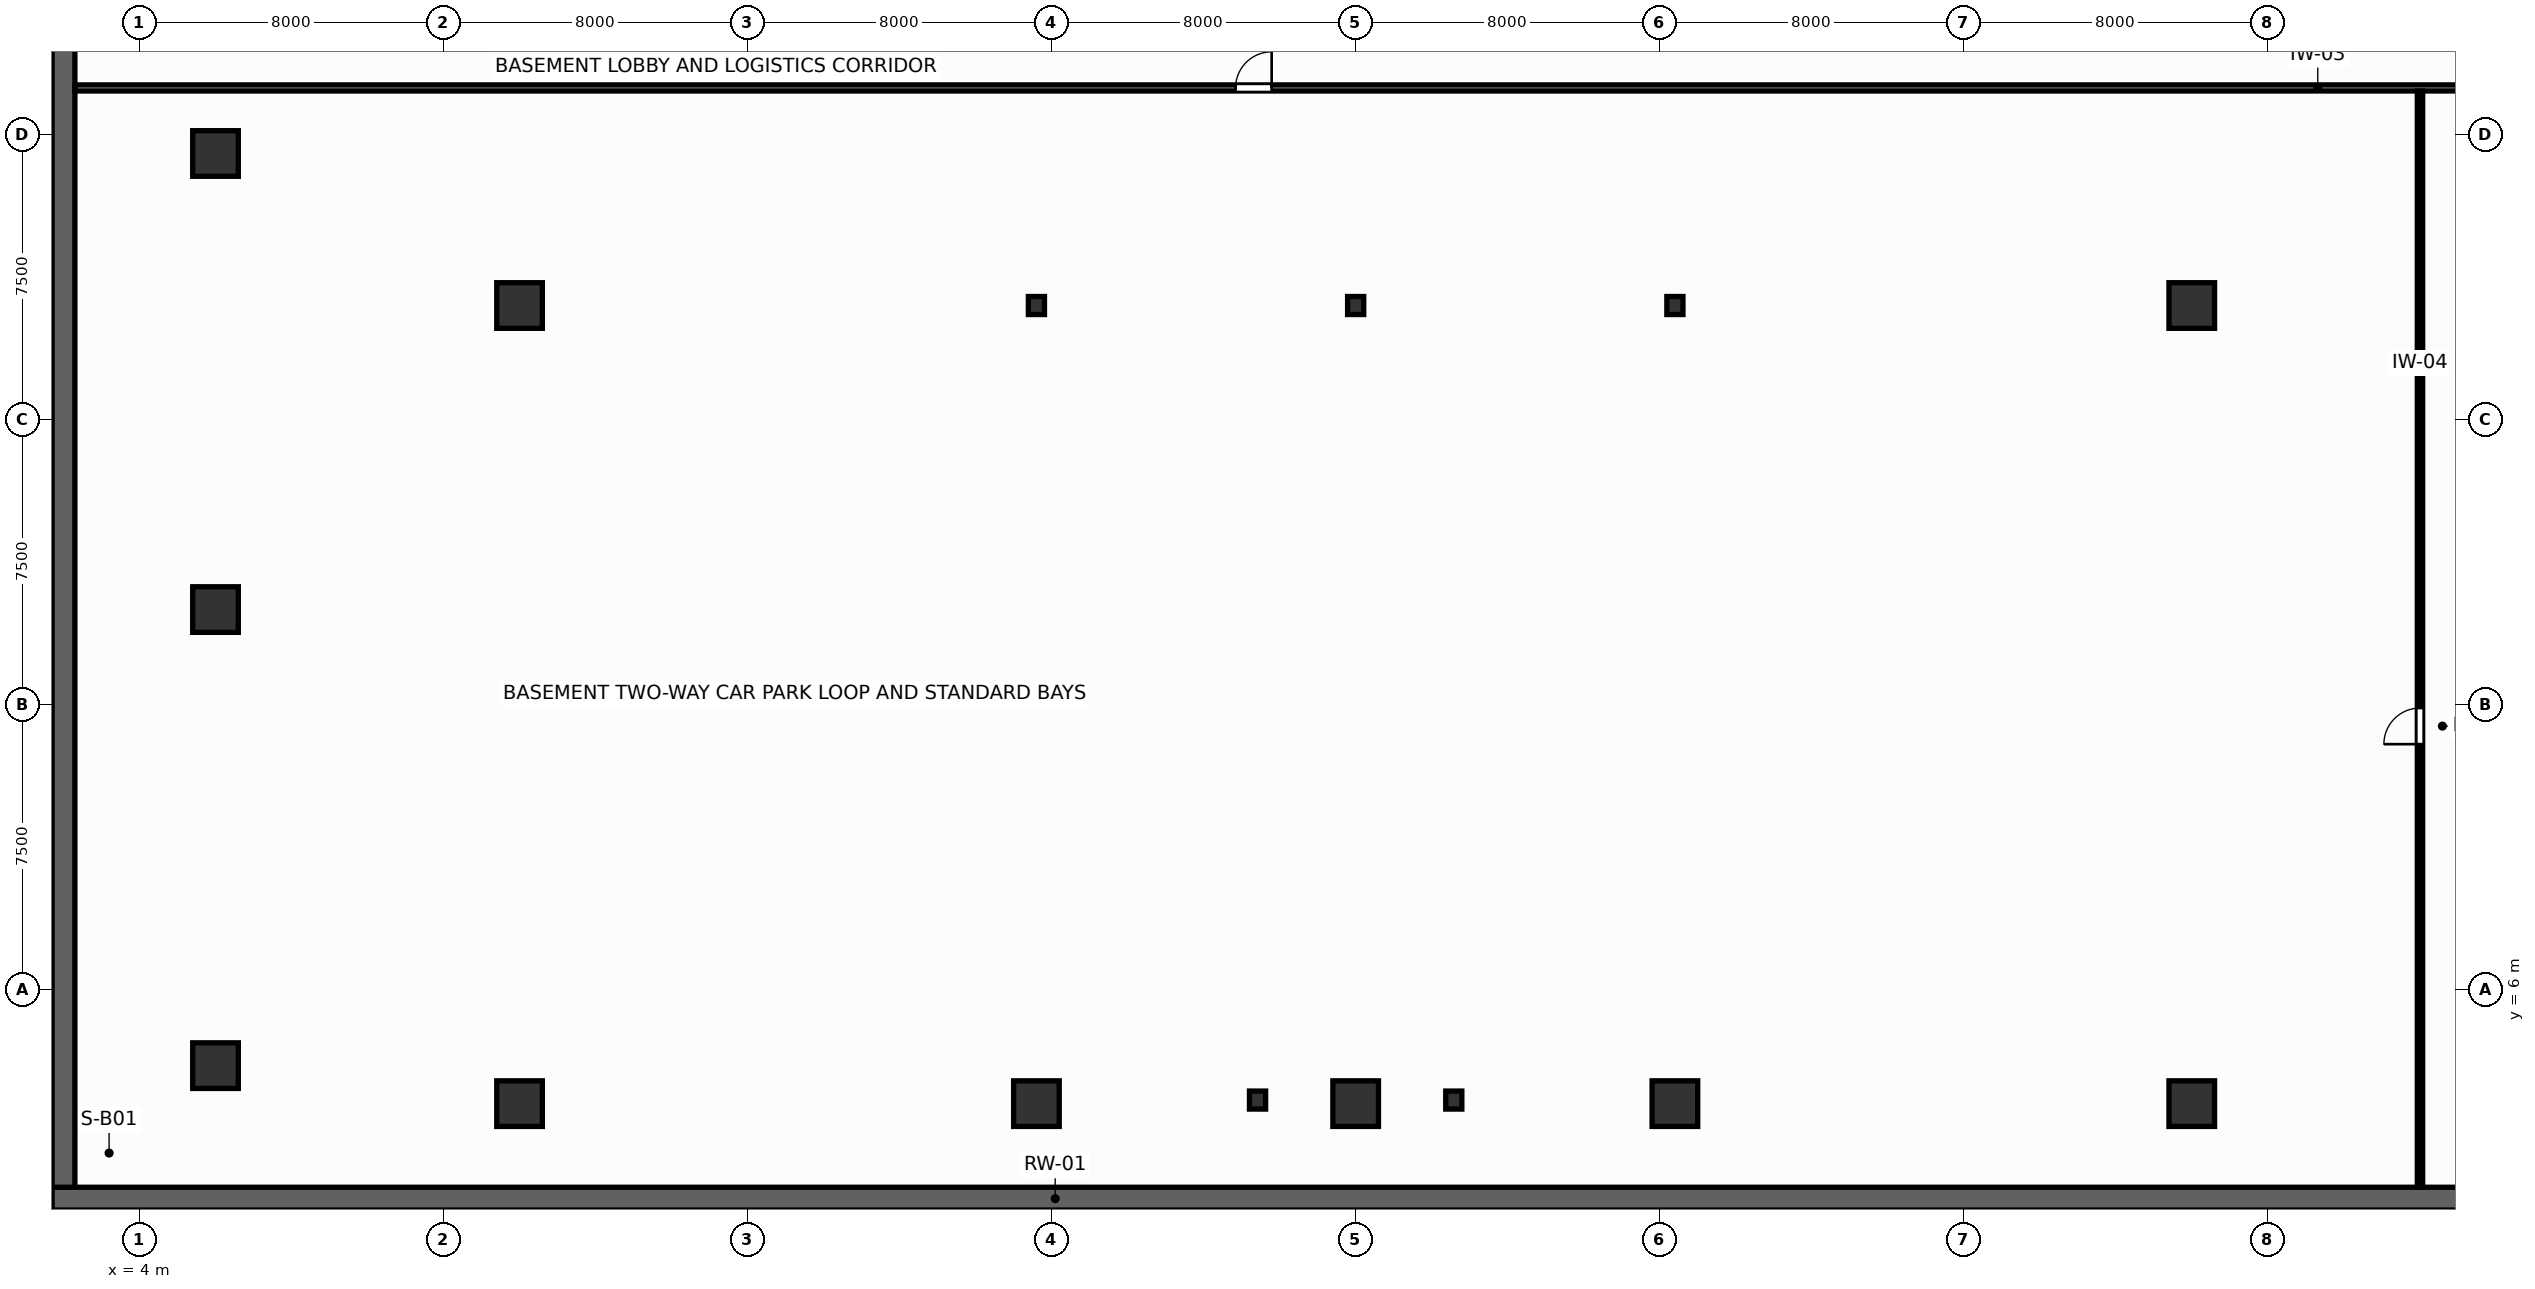
"""IFC4 building model, lengths in metres.
Left out: names, types, materials, properties, quantities, classifications, styles, units other than length and angle.
Written with IfcOpenShell. Run it as: python <this file> out.ifc"""

import sys

from ifc_helpers import new_model, si_unit, direction, frame, frame_2d, origin, origin_2d, place, context, subcontext, project, spatial, rectangle, i_section, extrude, source, transform, mapped, element, fill, save


model = new_model("IFC4")
c1 = context("Model", 3, precision=1e-05, world=origin(), true_north=direction((0.0, 1.0)))
c2 = subcontext(c1, "Body", "Model", "MODEL_VIEW")
j1 = project(units=[si_unit("LENGTHUNIT", "METRE"), si_unit("PLANEANGLEUNIT", "RADIAN")], contexts=[c1])
p1 = place(None, origin())
s1 = spatial("IfcSite", under=j1, at=p1, CompositionType="ELEMENT")
p2 = place(p1, origin())
s2 = spatial("IfcBuilding", under=s1, at=p2, CompositionType="ELEMENT")
p3 = place(p2, frame((0.0, 0.0, -4.5)))
s3 = spatial("IfcBuildingStorey", under=s2, at=p3, CompositionType="ELEMENT", Elevation=-4.5)
p4 = place(p3, frame((1.7, 0.5, 0.0), z_axis=(0.0, 0.0, 1.0), x_axis=(1.0, 0.0, 0.0)))
e1 = element("IfcWall", 1, at=p4, inside=s3, PredefinedType="SOLIDWALL", context=c2, shape_type="SweptSolid", body=[
    extrude(rectangle(XDim=87.98, YDim=0.6, at=frame_2d((43.99, 0.0))), origin(), (0.0, 0.0, 1.0), 4.5),
])
p5 = place(p3, frame((2.0, 0.8, 0.0), z_axis=(0.0, 0.0, 1.0), x_axis=(0.0, 1.0, 0.0)))
e2 = element("IfcWall", 2, at=p5, inside=s3, PredefinedType="SOLIDWALL", context=c2, shape_type="SweptSolid", body=[
    extrude(rectangle(XDim=64.9, YDim=0.6, at=frame_2d((32.45, 0.0))), origin(), (0.0, 0.0, 1.0), 4.5),
])
m1 = source(origin(), c2, "Body", "SweptSolid", [
    extrude(i_section(OverallWidth=0.424, OverallDepth=0.474, WebThickness=0.045, FlangeThickness=0.072, FilletRadius=0.015, at=origin_2d()), origin(), (0.0, 0.0, 1.0), 4.5),
])
for number, where, z_axis, x_axis in (
    (3, (27.6, 24.0, 0.0), (0.0, 0.0, 1.0), (1.0, 0.0, 0.0)),
    (4, (44.4, 24.0, 0.0), (0.0, 0.0, 1.0), (1.0, 0.0, 0.0)),
    (5, (36.0, 24.0, 0.0), (0.0, 0.0, 1.0), (1.0, 0.0, 0.0)),
):
    element("IfcColumn", number, at=place(p3, frame(where, z_axis=z_axis, x_axis=x_axis)), inside=s3, PredefinedType="COLUMN", context=c2, shape_type="MappedRepresentation", body=[
        mapped(m1, transform((0.0, 0.0, 0.0), scale=1.0)),
    ])
m2 = source(origin(), c2, "Body", "SweptSolid", [
    extrude(rectangle(XDim=1.2, YDim=1.2, at=origin_2d()), origin(), (0.0, 0.0, 1.0), 4.5),
])
for number, where, z_axis, x_axis in (
    (6, (6.0, 4.0, 0.0), (0.0, 0.0, 1.0), (1.0, 0.0, 0.0)),
    (7, (6.0, 16.0, 0.0), (0.0, 0.0, 1.0), (1.0, 0.0, 0.0)),
    (8, (6.0, 28.0, 0.0), (0.0, 0.0, 1.0), (1.0, 0.0, 0.0)),
    (9, (14.0, 3.0, 0.0), (0.0, 0.0, 1.0), (1.0, 0.0, 0.0)),
    (10, (27.6, 3.0, 0.0), (0.0, 0.0, 1.0), (1.0, 0.0, 0.0)),
    (11, (36.0, 3.0, 0.0), (0.0, 0.0, 1.0), (1.0, 0.0, 0.0)),
    (12, (44.4, 3.0, 0.0), (0.0, 0.0, 1.0), (1.0, 0.0, 0.0)),
    (13, (58.0, 3.0, 0.0), (0.0, 0.0, 1.0), (1.0, 0.0, 0.0)),
    (14, (14.0, 24.0, 0.0), (0.0, 0.0, 1.0), (1.0, 0.0, 0.0)),
    (15, (58.0, 24.0, 0.0), (0.0, 0.0, 1.0), (1.0, 0.0, 0.0)),
):
    element("IfcColumn", number, at=place(p3, frame(where, z_axis=z_axis, x_axis=x_axis)), inside=s3, PredefinedType="COLUMN", context=c2, shape_type="MappedRepresentation", body=[
        mapped(m2, transform((0.0, 0.0, 0.0), scale=1.0)),
    ])
for number, where, z_axis, x_axis in (
    (16, (33.418, 3.094, 0.0), (0.0, 0.0, 1.0), (1.0, 0.0, 0.0)),
    (17, (38.582, 3.094, 0.0), (0.0, 0.0, 1.0), (1.0, 0.0, 0.0)),
):
    element("IfcColumn", number, at=place(p3, frame(where, z_axis=z_axis, x_axis=x_axis)), inside=s3, PredefinedType="COLUMN", context=c2, shape_type="MappedRepresentation", body=[
        mapped(m1, transform((0.0, 0.0, 0.0), scale=1.0)),
    ])
p6 = place(p3, frame((2.302, 29.725, 0.0), z_axis=(0.0, 0.0, 1.0), x_axis=(1.0, 0.0, 0.0)))
e18 = element("IfcWall", 18, at=p6, inside=s3, PredefinedType="PARTITIONING", context=c2, shape_type="SweptSolid", body=[
    extrude(rectangle(XDim=86.358, YDim=0.16, at=frame_2d((43.179, 0.0))), origin(), (0.0, 0.0, 1.0), 3.73),
])
p7 = place(p6, frame((30.538, 0.0, 0.0)))
e19 = element("IfcOpeningElement", 19, at=p7, cuts=e18, PredefinedType="OPENING", context=c2, shape_type="SweptSolid", body=[
    extrude(rectangle(XDim=0.95, YDim=2.05, at=frame_2d((0.475, 1.025))), frame((0.0, 0.09, 0.0), z_axis=(0.0, -1.0, 0.0), x_axis=(1.0, 0.0, 0.0)), (0.0, 0.0, 1.0), 0.18),
])
p8 = place(p3, frame((64.005, 0.802, 0.0), z_axis=(0.0, 0.0, 1.0), x_axis=(0.0, 1.0, 0.0)))
e20 = element("IfcWall", 20, at=p8, inside=s3, PredefinedType="PARTITIONING", context=c2, shape_type="SweptSolid", body=[
    extrude(rectangle(XDim=28.841, YDim=0.14, at=frame_2d((14.42, 0.0))), origin(), (0.0, 0.0, 1.0), 4.22),
])
p9 = place(p8, frame((11.656, 0.0, 0.0)))
e21 = element("IfcOpeningElement", 21, at=p9, cuts=e20, PredefinedType="OPENING", context=c2, shape_type="SweptSolid", body=[
    extrude(rectangle(XDim=0.95, YDim=2.05, at=frame_2d((0.475, 1.025))), frame((0.0, 0.08, 0.0), z_axis=(0.0, -1.0, 0.0), x_axis=(1.0, 0.0, 0.0)), (0.0, 0.0, 1.0), 0.16),
])
p10 = place(p7, origin())
e22 = element("IfcDoor", 22, at=p10, inside=s3, OperationType="SINGLE_SWING_RIGHT", PredefinedType="DOOR", context=c2, shape_type="SweptSolid", body=[
    extrude(rectangle(XDim=0.95, YDim=2.05, at=frame_2d((0.475, 1.025))), frame((0.0, 0.025, 0.0), z_axis=(0.0, -1.0, 0.0), x_axis=(1.0, 0.0, 0.0)), (0.0, 0.0, 1.0), 0.05),
])
fill(e19, e22)
p11 = place(p9, origin())
e23 = element("IfcDoor", 23, at=p11, inside=s3, OperationType="SINGLE_SWING_LEFT", PredefinedType="DOOR", context=c2, shape_type="SweptSolid", body=[
    extrude(rectangle(XDim=0.95, YDim=2.05, at=frame_2d((0.475, 1.025))), frame((0.0, 0.025, 0.0), z_axis=(0.0, -1.0, 0.0), x_axis=(1.0, 0.0, 0.0)), (0.0, 0.0, 1.0), 0.05),
])
fill(e21, e23)
save(model, sys.argv[1])
